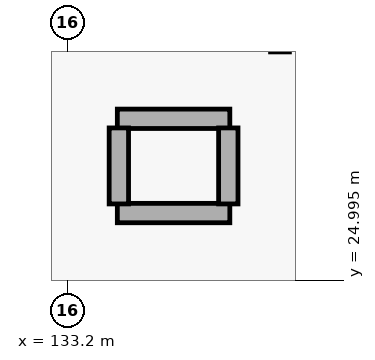
"""IFC4 building model, lengths in metres.
Left out: names, types, materials, properties, quantities, classifications, styles, units other than length and angle.
Written with IfcOpenShell. Run it as: python <this file> out.ifc"""

import sys

from ifc_helpers import new_model, si_unit, direction, frame, frame_2d, origin, place, context, subcontext, project, spatial, rectangle, extrude, element, save


model = new_model("IFC4")
c1 = context("Model", 3, precision=1e-05, world=origin(), true_north=direction((0.0, 1.0)))
c2 = subcontext(c1, "Body", "Model", "MODEL_VIEW")
j1 = project(units=[si_unit("LENGTHUNIT", "METRE"), si_unit("PLANEANGLEUNIT", "RADIAN")], contexts=[c1])
p1 = place(None, origin())
s1 = spatial("IfcSite", under=j1, at=p1, CompositionType="ELEMENT")
p2 = place(p1, origin())
s2 = spatial("IfcBuilding", under=s1, at=p2, CompositionType="ELEMENT")
p3 = place(p2, origin())
s3 = spatial("IfcBuildingStorey", under=s2, at=p3, CompositionType="ELEMENT", Elevation=0.0)
for number, where, z_axis, x_axis in (
    (1, (133.86, 27.12, 0.0), (0.0, 0.0, 1.0), (1.0, 0.0, 0.0)),
    (2, (133.86, 25.88, 0.0), (0.0, 0.0, 1.0), (1.0, 0.0, 0.0)),
):
    element("IfcWall", number, at=place(p3, frame(where, z_axis=z_axis, x_axis=x_axis)), inside=s3, PredefinedType="PARTITIONING", context=c2, shape_type="SweptSolid", body=[
        extrude(rectangle(XDim=1.48, YDim=0.255, at=frame_2d((0.74, 0.0))), origin(), (0.0, 0.0, 1.0), 5.04),
    ])
for number, where, z_axis, x_axis in (
    (3, (133.88, 26.0, 0.0), (0.0, 0.0, 1.0), (0.0, 1.0, 0.0)),
    (4, (135.32, 26.0, 0.0), (0.0, 0.0, 1.0), (0.0, 1.0, 0.0)),
):
    element("IfcWall", number, at=place(p3, frame(where, z_axis=z_axis, x_axis=x_axis)), inside=s3, PredefinedType="PARTITIONING", context=c2, shape_type="SweptSolid", body=[
        extrude(rectangle(XDim=1.0, YDim=0.255, at=frame_2d((0.5, 0.0))), origin(), (0.0, 0.0, 1.0), 5.04),
    ])
save(model, sys.argv[1])
